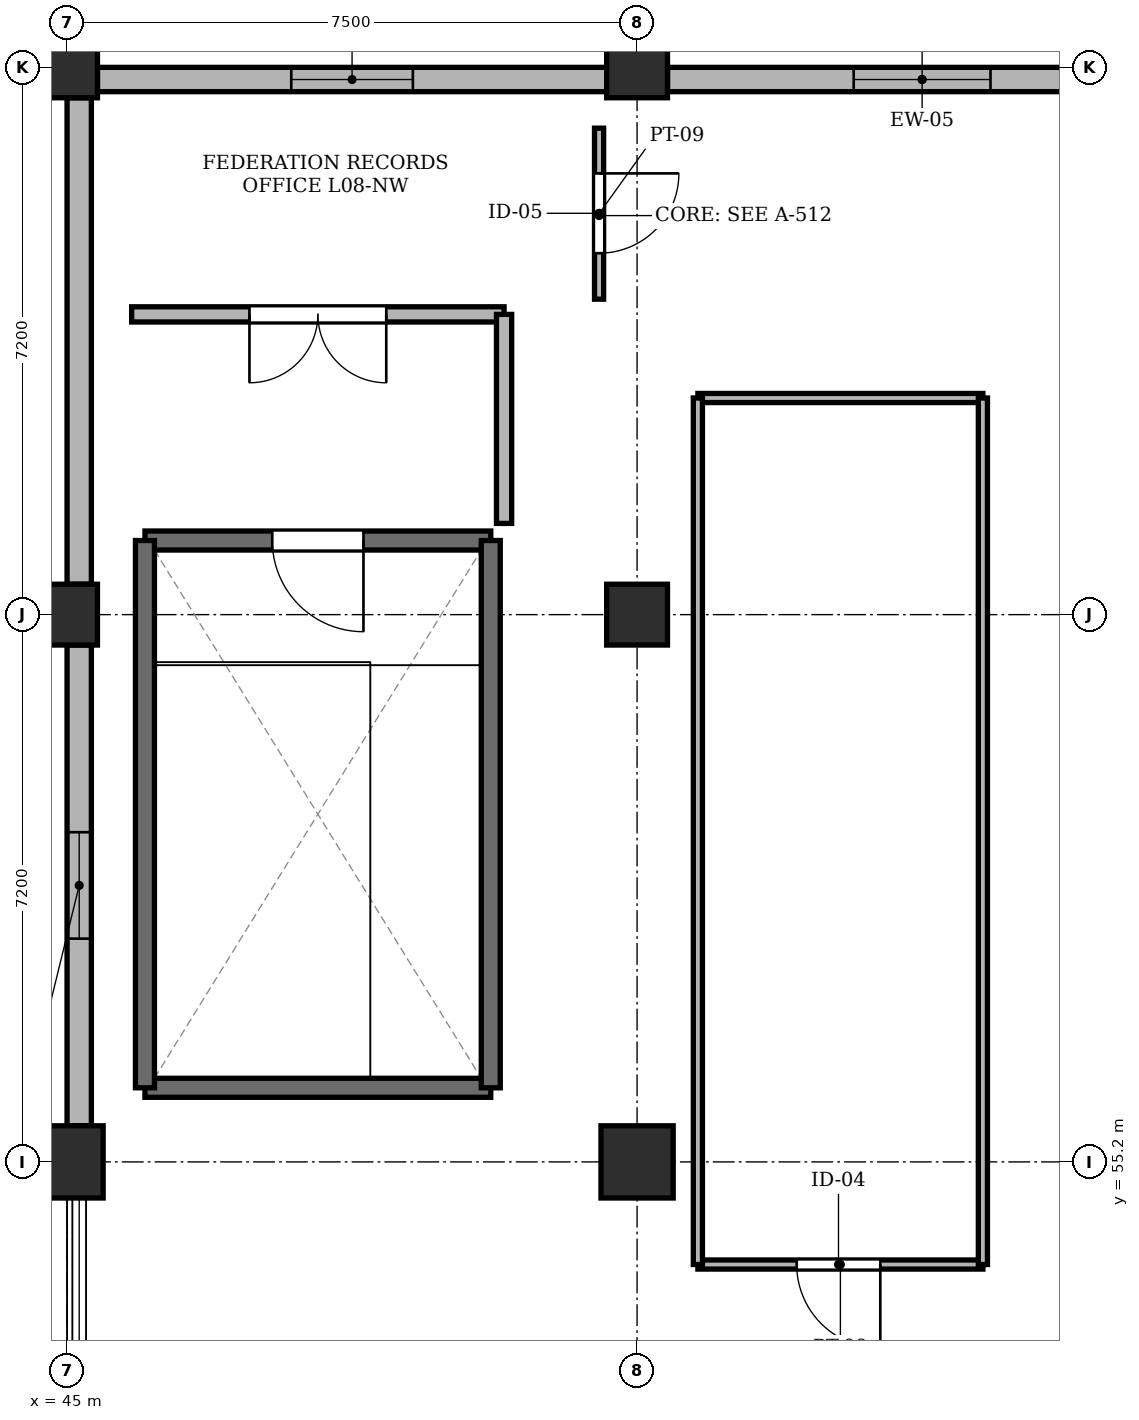
"""IFC4 building model, lengths in metres.
Left out: names, types, materials, properties, quantities, classifications, styles, units other than length and angle.
Written with IfcOpenShell. Run it as: python <this file> out.ifc"""

import sys

from ifc_helpers import new_model, si_unit, direction, frame, frame_2d, origin, origin_2d, place, context, subcontext, project, spatial, rectangle, extrude, element, fill, save


model = new_model("IFC4")
c1 = context("Model", 3, precision=1e-05, world=origin(), true_north=direction((0.0, 1.0)))
c2 = subcontext(c1, "Body", "Model", "MODEL_VIEW")
j1 = project(units=[si_unit("LENGTHUNIT", "METRE"), si_unit("PLANEANGLEUNIT", "RADIAN")], contexts=[c1])
p1 = place(None, origin())
s1 = spatial("IfcSite", under=j1, at=p1, CompositionType="ELEMENT")
p2 = place(p1, origin())
s2 = spatial("IfcBuilding", under=s1, at=p2, CompositionType="ELEMENT")
p3 = place(p2, frame((0.0, 0.0, 37.3)))
s3 = spatial("IfcBuildingStorey", under=s2, at=p3, CompositionType="ELEMENT", Elevation=37.3)
p4 = place(p3, frame((45.0, 55.2, -0.25), z_axis=(0.0, 0.0, 1.0), x_axis=(1.0, 0.0, 0.0)))
e1 = element("IfcColumn", 1, at=p4, inside=s3, PredefinedType="COLUMN", context=c2, shape_type="SweptSolid", body=[
    extrude(rectangle(XDim=0.95, YDim=0.95, at=origin_2d()), origin(), (0.0, 0.0, 1.0), 3.26),
])
for number, where, z_axis, x_axis in (
    (2, (45.0, 62.4, -0.25), (0.0, 0.0, 1.0), (1.0, 0.0, 0.0)),
    (3, (45.0, 69.6, -0.25), (0.0, 0.0, 1.0), (1.0, 0.0, 0.0)),
):
    element("IfcColumn", number, at=place(p3, frame(where, z_axis=z_axis, x_axis=x_axis)), inside=s3, PredefinedType="COLUMN", context=c2, shape_type="SweptSolid", body=[
        extrude(rectangle(XDim=0.8, YDim=0.8, at=origin_2d()), origin(), (0.0, 0.0, 1.0), 3.26),
    ])
p5 = place(p3, frame((52.5, 55.2, -0.25), z_axis=(0.0, 0.0, 1.0), x_axis=(1.0, 0.0, 0.0)))
e4 = element("IfcColumn", 4, at=p5, inside=s3, PredefinedType="COLUMN", context=c2, shape_type="SweptSolid", body=[
    extrude(rectangle(XDim=0.95, YDim=0.95, at=origin_2d()), origin(), (0.0, 0.0, 1.0), 3.26),
])
for number, where, z_axis, x_axis in (
    (5, (52.5, 62.4, -0.25), (0.0, 0.0, 1.0), (1.0, 0.0, 0.0)),
    (6, (52.5, 69.6, -0.25), (0.0, 0.0, 1.0), (1.0, 0.0, 0.0)),
):
    element("IfcColumn", number, at=place(p3, frame(where, z_axis=z_axis, x_axis=x_axis)), inside=s3, PredefinedType="COLUMN", context=c2, shape_type="SweptSolid", body=[
        extrude(rectangle(XDim=0.8, YDim=0.8, at=origin_2d()), origin(), (0.0, 0.0, 1.0), 3.26),
    ])
p6 = place(p3, frame((59.6, 69.44, 0.0), z_axis=(0.0, 0.0, 1.0), x_axis=(-1.0, 0.0, 0.0)))
e7 = element("IfcWall", 7, at=p6, inside=s3, PredefinedType="SOLIDWALL", context=c2, shape_type="SweptSolid", body=[
    extrude(rectangle(XDim=6.7, YDim=0.32, at=frame_2d((3.35, 0.0))), origin(), (0.0, 0.0, 1.0), 2.53),
])
p7 = place(p6, frame((2.45, 0.0, 0.62)))
e8 = element("IfcOpeningElement", 8, at=p7, cuts=e7, PredefinedType="OPENING", context=c2, shape_type="SweptSolid", body=[
    extrude(rectangle(XDim=1.8, YDim=1.81, at=frame_2d((0.9, 0.905))), frame((0.0, 0.172, 0.0), z_axis=(0.0, -1.0, 0.0), x_axis=(1.0, 0.0, 0.0)), (0.0, 0.0, 1.0), 0.344),
])
p8 = place(p3, frame((52.1, 69.44, 0.0), z_axis=(0.0, 0.0, 1.0), x_axis=(-1.0, 0.0, 0.0)))
e9 = element("IfcWall", 9, at=p8, inside=s3, PredefinedType="SOLIDWALL", context=c2, shape_type="SweptSolid", body=[
    extrude(rectangle(XDim=6.7, YDim=0.32, at=frame_2d((3.35, 0.0))), origin(), (0.0, 0.0, 1.0), 2.53),
])
p9 = place(p8, frame((2.55, 0.0, 0.62)))
e10 = element("IfcOpeningElement", 10, at=p9, cuts=e9, PredefinedType="OPENING", context=c2, shape_type="SweptSolid", body=[
    extrude(rectangle(XDim=1.6, YDim=1.81, at=frame_2d((0.8, 0.905))), frame((0.0, 0.172, 0.0), z_axis=(0.0, -1.0, 0.0), x_axis=(1.0, 0.0, 0.0)), (0.0, 0.0, 1.0), 0.344),
])
p10 = place(p3, frame((45.16, 69.2, 0.0), z_axis=(0.0, 0.0, 1.0), x_axis=(0.0, -1.0, 0.0)))
e11 = element("IfcWall", 11, at=p10, inside=s3, PredefinedType="SOLIDWALL", context=c2, shape_type="SweptSolid", body=[
    extrude(rectangle(XDim=6.4, YDim=0.32, at=frame_2d((3.2, 0.0))), origin(), (0.0, 0.0, 1.0), 2.53),
])
p11 = place(p3, frame((45.16, 62.0, 0.0), z_axis=(0.0, 0.0, 1.0), x_axis=(0.0, -1.0, 0.0)))
e12 = element("IfcWall", 12, at=p11, inside=s3, PredefinedType="SOLIDWALL", context=c2, shape_type="SweptSolid", body=[
    extrude(rectangle(XDim=6.325, YDim=0.32, at=frame_2d((3.163, 0.0))), origin(), (0.0, 0.0, 1.0), 2.53),
])
p12 = place(p11, frame((2.462, 0.0, 0.62)))
e13 = element("IfcOpeningElement", 13, at=p12, cuts=e12, PredefinedType="OPENING", context=c2, shape_type="SweptSolid", body=[
    extrude(rectangle(XDim=1.4, YDim=1.81, at=frame_2d((0.7, 0.905))), frame((0.0, 0.172, 0.0), z_axis=(0.0, -1.0, 0.0), x_axis=(1.0, 0.0, 0.0)), (0.0, 0.0, 1.0), 0.344),
])
p13 = place(p3, frame((46.025, 56.175, 0.0), z_axis=(0.0, 0.0, 1.0), x_axis=(1.0, 0.0, 0.0)))
e14 = element("IfcWall", 14, at=p13, inside=s3, PredefinedType="SHEAR", context=c2, shape_type="SweptSolid", body=[
    extrude(rectangle(XDim=4.55, YDim=0.25, at=frame_2d((2.275, 0.0))), origin(), (0.0, 0.0, 1.0), 3.01),
])
p14 = place(p3, frame((50.575, 63.375, 0.0), z_axis=(0.0, 0.0, 1.0), x_axis=(-1.0, 0.0, 0.0)))
e15 = element("IfcWall", 15, at=p14, inside=s3, PredefinedType="SHEAR", context=c2, shape_type="SweptSolid", body=[
    extrude(rectangle(XDim=4.55, YDim=0.25, at=frame_2d((2.275, 0.0))), origin(), (0.0, 0.0, 1.0), 3.01),
])
p15 = place(p14, frame((1.675, 0.0, 0.0)))
e16 = element("IfcOpeningElement", 16, at=p15, cuts=e15, PredefinedType="OPENING", context=c2, shape_type="SweptSolid", body=[
    extrude(rectangle(XDim=1.2, YDim=2.2, at=frame_2d((0.6, 1.1))), frame((0.0, 0.137, 0.0), z_axis=(0.0, -1.0, 0.0), x_axis=(1.0, 0.0, 0.0)), (0.0, 0.0, 1.0), 0.274),
])
for number, where, z_axis, x_axis in (
    (17, (46.025, 63.375, 0.0), (0.0, 0.0, 1.0), (0.0, -1.0, 0.0)),
    (18, (50.575, 56.175, 0.0), (0.0, 0.0, 1.0), (0.0, 1.0, 0.0)),
):
    element("IfcWall", number, at=place(p3, frame(where, z_axis=z_axis, x_axis=x_axis)), inside=s3, PredefinedType="SHEAR", context=c2, shape_type="SweptSolid", body=[
        extrude(rectangle(XDim=7.2, YDim=0.25, at=frame_2d((3.6, 0.0))), origin(), (0.0, 0.0, 1.0), 3.01),
    ])
p16 = place(p3, frame((45.85, 66.35, 0.0), z_axis=(0.0, 0.0, 1.0), x_axis=(1.0, 0.0, 0.0)))
e19 = element("IfcWall", 19, at=p16, inside=s3, PredefinedType="PARTITIONING", context=c2, shape_type="SweptSolid", body=[
    extrude(rectangle(XDim=4.9, YDim=0.2, at=frame_2d((2.45, 0.0))), origin(), (0.0, 0.0, 1.0), 2.53),
])
p17 = place(p16, frame((1.55, 0.0, 0.0)))
e20 = element("IfcOpeningElement", 20, at=p17, cuts=e19, PredefinedType="OPENING", context=c2, shape_type="SweptSolid", body=[
    extrude(rectangle(XDim=1.8, YDim=2.2, at=frame_2d((0.9, 1.1))), frame((0.0, 0.112, 0.0), z_axis=(0.0, -1.0, 0.0), x_axis=(1.0, 0.0, 0.0)), (0.0, 0.0, 1.0), 0.224),
])
p18 = place(p3, frame((50.75, 63.6, 0.0), z_axis=(0.0, 0.0, 1.0), x_axis=(0.0, 1.0, 0.0)))
e21 = element("IfcWall", 21, at=p18, inside=s3, PredefinedType="PARTITIONING", context=c2, shape_type="SweptSolid", body=[
    extrude(rectangle(XDim=2.75, YDim=0.2, at=frame_2d((1.375, 0.0))), origin(), (0.0, 0.0, 1.0), 2.53),
])
p19 = place(p3, frame((53.3, 53.85, 0.0), z_axis=(0.0, 0.0, 1.0), x_axis=(1.0, 0.0, 0.0)))
e22 = element("IfcWall", 22, at=p19, inside=s3, PredefinedType="PARTITIONING", context=c2, shape_type="SweptSolid", body=[
    extrude(rectangle(XDim=3.75, YDim=0.12, at=frame_2d((1.875, 0.0))), origin(), (0.0, 0.0, 1.0), 2.53),
])
p20 = place(p19, frame((1.3, 0.0, 0.0)))
e23 = element("IfcOpeningElement", 23, at=p20, cuts=e22, PredefinedType="OPENING", context=c2, shape_type="SweptSolid", body=[
    extrude(rectangle(XDim=1.1, YDim=2.15, at=frame_2d((0.55, 1.075))), frame((0.0, 0.072, 0.0), z_axis=(0.0, -1.0, 0.0), x_axis=(1.0, 0.0, 0.0)), (0.0, 0.0, 1.0), 0.144),
])
p21 = place(p3, frame((53.3, 65.25, 0.0), z_axis=(0.0, 0.0, 1.0), x_axis=(1.0, 0.0, 0.0)))
e24 = element("IfcWall", 24, at=p21, inside=s3, PredefinedType="PARTITIONING", context=c2, shape_type="SweptSolid", body=[
    extrude(rectangle(XDim=3.75, YDim=0.12, at=frame_2d((1.875, 0.0))), origin(), (0.0, 0.0, 1.0), 2.53),
])
for number, where, z_axis, x_axis in (
    (25, (53.3, 53.85, 0.0), (0.0, 0.0, 1.0), (0.0, 1.0, 0.0)),
    (26, (57.05, 53.85, 0.0), (0.0, 0.0, 1.0), (0.0, 1.0, 0.0)),
):
    element("IfcWall", number, at=place(p3, frame(where, z_axis=z_axis, x_axis=x_axis)), inside=s3, PredefinedType="PARTITIONING", context=c2, shape_type="SweptSolid", body=[
        extrude(rectangle(XDim=11.4, YDim=0.12, at=frame_2d((5.7, 0.0))), origin(), (0.0, 0.0, 1.0), 2.53),
    ])
p22 = place(p3, frame((52.0, 66.55, 0.0), z_axis=(0.0, 0.0, 1.0), x_axis=(0.0, 1.0, 0.0)))
e27 = element("IfcWall", 27, at=p22, inside=s3, PredefinedType="PARTITIONING", context=c2, shape_type="SweptSolid", body=[
    extrude(rectangle(XDim=2.25, YDim=0.12, at=frame_2d((1.125, 0.0))), origin(), (0.0, 0.0, 1.0), 2.53),
])
p23 = place(p22, frame((0.605, 0.0, 0.0)))
e28 = element("IfcOpeningElement", 28, at=p23, cuts=e27, PredefinedType="OPENING", context=c2, shape_type="SweptSolid", body=[
    extrude(rectangle(XDim=1.05, YDim=2.15, at=frame_2d((0.525, 1.075))), frame((0.0, 0.072, 0.0), z_axis=(0.0, -1.0, 0.0), x_axis=(1.0, 0.0, 0.0)), (0.0, 0.0, 1.0), 0.144),
])
p24 = place(p7, origin())
e29 = element("IfcWindow", 29, at=p24, inside=s3, PartitioningType="SINGLE_PANEL", PredefinedType="WINDOW", context=c2, shape_type="SweptSolid", body=[
    extrude(rectangle(XDim=1.8, YDim=1.81, at=frame_2d((0.9, 0.905))), frame((0.0, 0.03, 0.0), z_axis=(0.0, -1.0, 0.0), x_axis=(1.0, 0.0, 0.0)), (0.0, 0.0, 1.0), 0.06),
])
fill(e8, e29)
p25 = place(p9, origin())
e30 = element("IfcWindow", 30, at=p25, inside=s3, PartitioningType="SINGLE_PANEL", PredefinedType="WINDOW", context=c2, shape_type="SweptSolid", body=[
    extrude(rectangle(XDim=1.6, YDim=1.81, at=frame_2d((0.8, 0.905))), frame((0.0, 0.03, 0.0), z_axis=(0.0, -1.0, 0.0), x_axis=(1.0, 0.0, 0.0)), (0.0, 0.0, 1.0), 0.06),
])
fill(e10, e30)
p26 = place(p12, origin())
e31 = element("IfcWindow", 31, at=p26, inside=s3, PartitioningType="SINGLE_PANEL", PredefinedType="WINDOW", context=c2, shape_type="SweptSolid", body=[
    extrude(rectangle(XDim=1.4, YDim=1.81, at=frame_2d((0.7, 0.905))), frame((0.0, 0.03, 0.0), z_axis=(0.0, -1.0, 0.0), x_axis=(1.0, 0.0, 0.0)), (0.0, 0.0, 1.0), 0.06),
])
fill(e13, e31)
p27 = place(p15, origin())
e32 = element("IfcDoor", 32, at=p27, inside=s3, OperationType="SINGLE_SWING_LEFT", PredefinedType="DOOR", context=c2, shape_type="SweptSolid", body=[
    extrude(rectangle(XDim=1.2, YDim=2.2, at=frame_2d((0.6, 1.1))), frame((0.0, 0.025, 0.0), z_axis=(0.0, -1.0, 0.0), x_axis=(1.0, 0.0, 0.0)), (0.0, 0.0, 1.0), 0.05),
])
fill(e16, e32)
p28 = place(p17, frame((1.8, 0.0, 0.0), z_axis=(0.0, 0.0, 1.0), x_axis=(-1.0, 0.0, 0.0)))
e33 = element("IfcDoor", 33, at=p28, inside=s3, OperationType="DOUBLE_DOOR_SINGLE_SWING", PredefinedType="DOOR", context=c2, shape_type="SweptSolid", body=[
    extrude(rectangle(XDim=1.8, YDim=2.2, at=frame_2d((0.9, 1.1))), frame((0.0, 0.025, 0.0), z_axis=(0.0, -1.0, 0.0), x_axis=(1.0, 0.0, 0.0)), (0.0, 0.0, 1.0), 0.05),
])
fill(e20, e33)
p29 = place(p20, frame((1.1, 0.0, 0.0), z_axis=(0.0, 0.0, 1.0), x_axis=(-1.0, 0.0, 0.0)))
e34 = element("IfcDoor", 34, at=p29, inside=s3, OperationType="SINGLE_SWING_RIGHT", PredefinedType="DOOR", context=c2, shape_type="SweptSolid", body=[
    extrude(rectangle(XDim=1.1, YDim=2.15, at=frame_2d((0.55, 1.075))), frame((0.0, 0.025, 0.0), z_axis=(0.0, -1.0, 0.0), x_axis=(1.0, 0.0, 0.0)), (0.0, 0.0, 1.0), 0.05),
])
fill(e23, e34)
p30 = place(p23, frame((1.05, 0.0, 0.0), z_axis=(0.0, 0.0, 1.0), x_axis=(-1.0, 0.0, 0.0)))
e35 = element("IfcDoor", 35, at=p30, inside=s3, OperationType="SINGLE_SWING_RIGHT", PredefinedType="DOOR", context=c2, shape_type="SweptSolid", body=[
    extrude(rectangle(XDim=1.05, YDim=2.15, at=frame_2d((0.525, 1.075))), frame((0.0, 0.025, 0.0), z_axis=(0.0, -1.0, 0.0), x_axis=(1.0, 0.0, 0.0)), (0.0, 0.0, 1.0), 0.05),
])
fill(e28, e35)
save(model, sys.argv[1])
